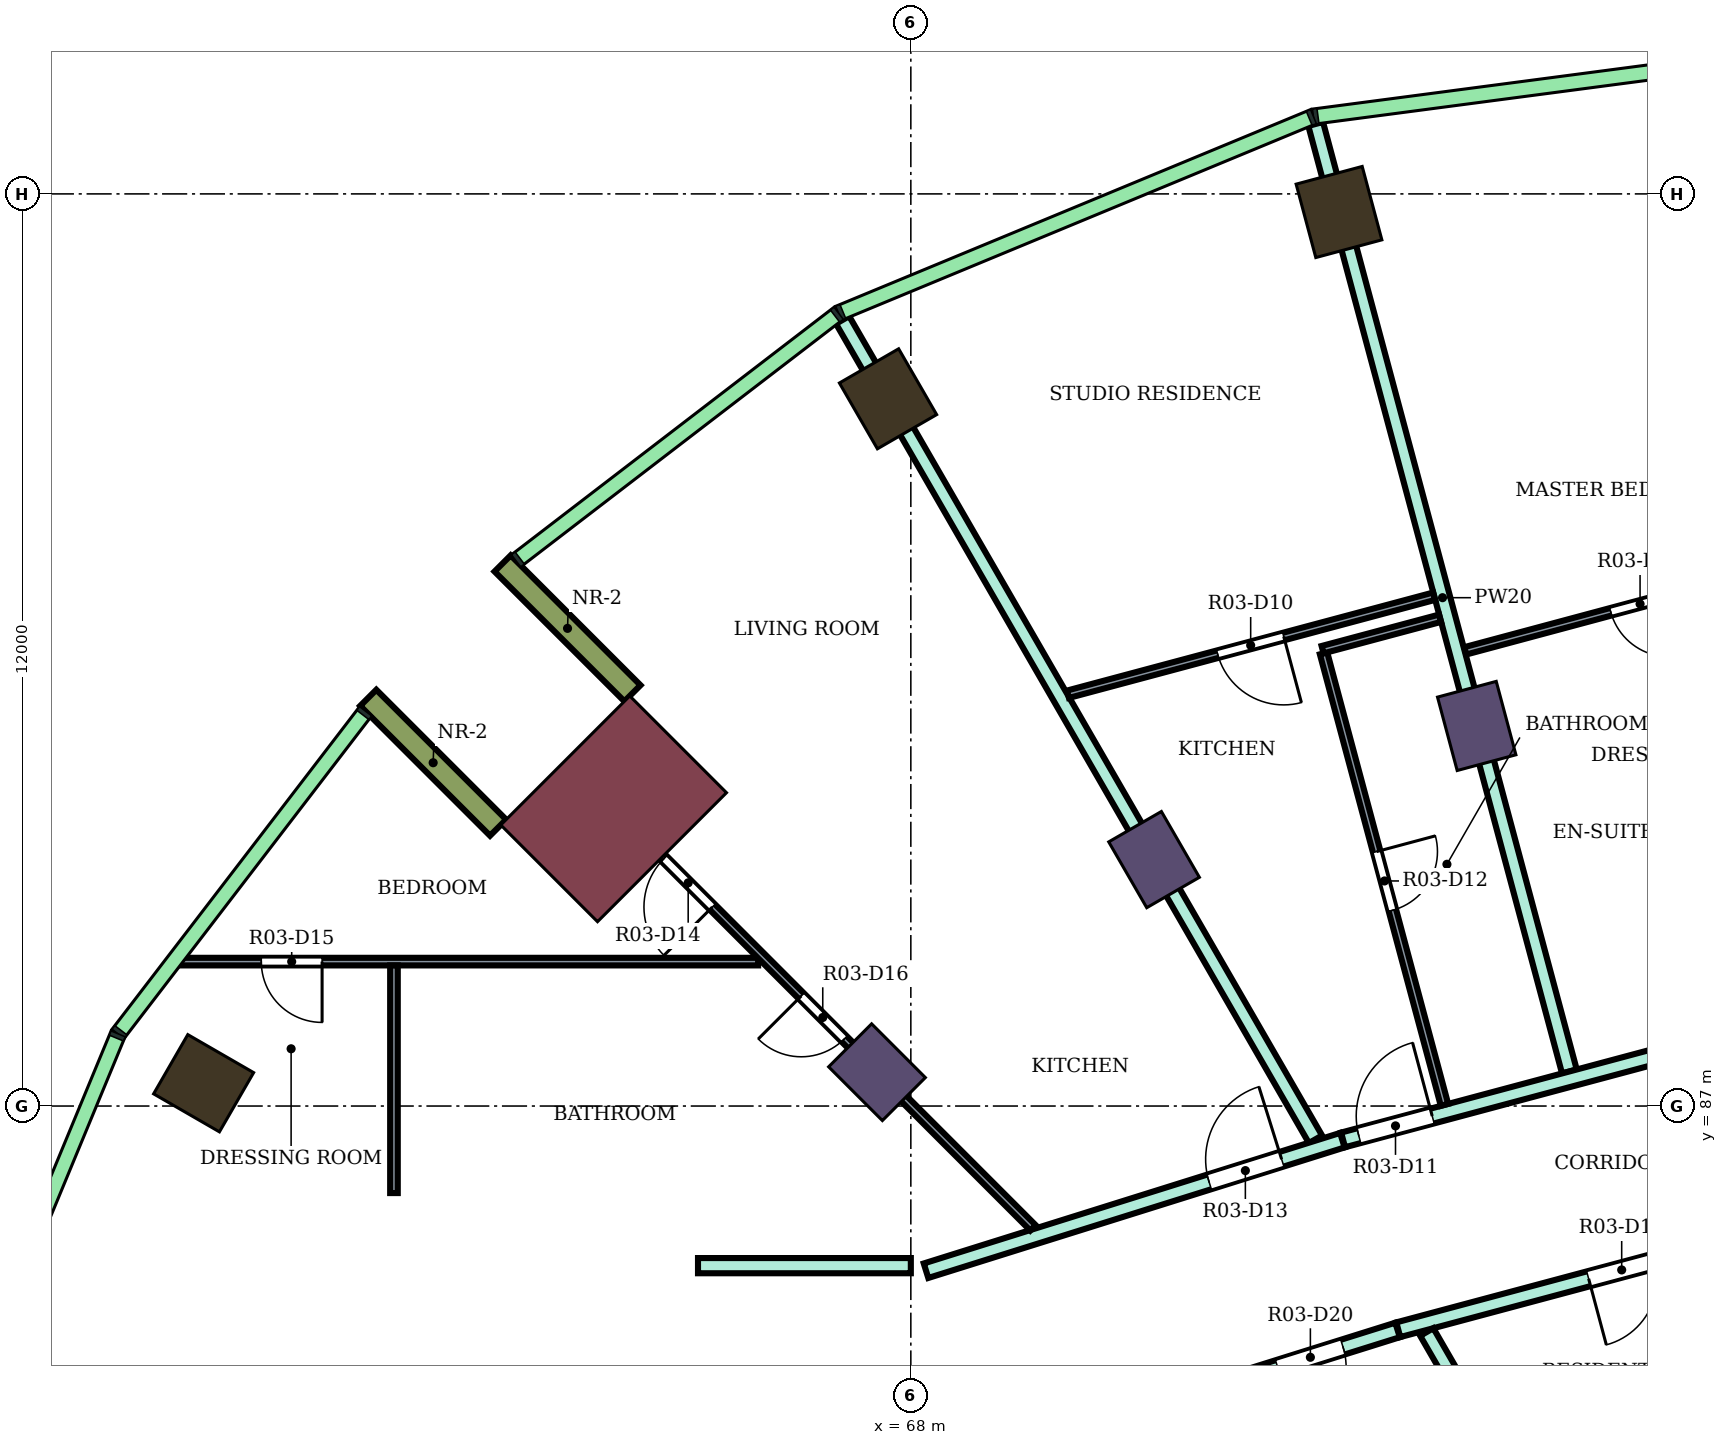
"""IFC4 building model, lengths in metres.
Left out: names, types, materials, properties, quantities, classifications, styles, units other than length and angle.
Written with IfcOpenShell. Run it as: python <this file> out.ifc"""

import sys

from ifc_helpers import new_model, si_unit, direction, frame, frame_2d, origin, origin_2d, place, context, subcontext, project, spatial, rectangle, extrude, element, fill, save


model = new_model("IFC4")
c1 = context("Model", 3, precision=1e-05, world=origin(), true_north=direction((0.0, 1.0)))
c2 = subcontext(c1, "Body", "Model", "MODEL_VIEW")
j1 = project(units=[si_unit("LENGTHUNIT", "METRE"), si_unit("PLANEANGLEUNIT", "RADIAN")], contexts=[c1])
p1 = place(None, origin())
s1 = spatial("IfcSite", under=j1, at=p1, CompositionType="ELEMENT")
p2 = place(p1, origin())
s2 = spatial("IfcBuilding", under=s1, at=p2, CompositionType="ELEMENT")
p3 = place(p2, frame((0.0, 0.0, 186.4)))
s3 = spatial("IfcBuildingStorey", under=s2, at=p3, CompositionType="ELEMENT", Elevation=186.4)
for number, where, z_axis, x_axis in (
    (1, (73.633, 98.762, 0.0), (0.0, 0.0, 1.0), (-0.259, 0.966, 0.0)),
    (2, (67.7, 96.304, 0.0), (0.0, 0.0, 1.0), (-0.5, 0.866, 0.0)),
    (3, (58.696, 87.3, 0.0), (0.0, 0.0, 1.0), (-0.866, 0.5, 0.0)),
):
    element("IfcColumn", number, at=place(p3, frame(where, z_axis=z_axis, x_axis=x_axis)), inside=s3, PredefinedType="COLUMN", context=c2, shape_type="SweptSolid", body=[
        extrude(rectangle(XDim=1.0, YDim=0.9, at=origin_2d()), origin(), (0.0, 0.0, 1.0), 4.1),
    ])
for number, where, z_axis, x_axis in (
    (4, (75.445, 92.0, 0.0), (0.0, 0.0, 1.0), (-0.259, 0.966, 0.0)),
    (5, (71.2, 90.242, 0.0), (0.0, 0.0, 1.0), (-0.5, 0.866, 0.0)),
    (6, (67.555, 87.445, 0.0), (0.0, 0.0, 1.0), (-0.707, 0.707, 0.0)),
):
    element("IfcColumn", number, at=place(p3, frame(where, z_axis=z_axis, x_axis=x_axis)), inside=s3, PredefinedType="COLUMN", context=c2, shape_type="SweptSolid", body=[
        extrude(rectangle(XDim=1.0, YDim=0.8, at=origin_2d()), origin(), (0.0, 0.0, 1.0), 4.1),
    ])
p4 = place(p3, frame((64.09, 90.91, 0.0), z_axis=(0.0, 0.0, 1.0), x_axis=(-0.707106781187, 0.707106781187, 0.0)))
e7 = element("IfcColumn", 7, at=p4, inside=s3, PredefinedType="COLUMN", context=c2, shape_type="SweptSolid", body=[
    extrude(rectangle(XDim=1.8, YDim=2.4, at=origin_2d()), origin(), (0.0, 0.0, 1.0), 4.1),
])
for number, where, z_axis, x_axis in (
    (8, (64.338, 92.43, 0.0), (0.0, 0.0, 1.0), (-0.707, 0.707, 0.0)),
    (9, (62.57, 90.662, 0.0), (0.0, 0.0, 1.0), (-0.707, 0.707, 0.0)),
):
    element("IfcWall", number, at=place(p3, frame(where, z_axis=z_axis, x_axis=x_axis)), inside=s3, PredefinedType="NOTDEFINED", context=c2, shape_type="SweptSolid", body=[
        extrude(rectangle(XDim=2.416, YDim=0.3, at=frame_2d((1.208, 0.0))), origin(), (0.0, 0.0, 1.0), 4.1),
    ])
p5 = place(p3, frame((65.2, 84.9, 0.0), z_axis=(0.0, 0.0, 1.0), x_axis=(1.0, 0.0, 0.0)))
e10 = element("IfcWall", 10, at=p5, inside=s3, PredefinedType="PARTITIONING", context=c2, shape_type="SweptSolid", body=[
    extrude(rectangle(XDim=2.8, YDim=0.2, at=frame_2d((1.4, 0.0))), origin(), (0.0, 0.0, 1.0), 3.65),
])
p6 = place(p3, frame((67.102, 97.342, 0.0), z_axis=(0.0, 0.0, 1.0), x_axis=(0.499940938316, -0.866059500378, 0.0)))
e11 = element("IfcWall", 11, at=p6, inside=s3, PredefinedType="PARTITIONING", context=c2, shape_type="SweptSolid", body=[
    extrude(rectangle(XDim=12.446, YDim=0.2, at=frame_2d((6.223, 0.0))), origin(), (0.0, 0.0, 1.0), 3.65),
])
p7 = place(p3, frame((68.2, 84.833, 0.0), z_axis=(0.0, 0.0, 1.0), x_axis=(0.954204109499, 0.299156342762, 0.0)))
e12 = element("IfcWall", 12, at=p7, inside=s3, PredefinedType="PARTITIONING", context=c2, shape_type="SweptSolid", body=[
    extrude(rectangle(XDim=5.74, YDim=0.2, at=frame_2d((2.87, 0.0))), origin(), (0.0, 0.0, 1.0), 3.65),
])
p8 = place(p7, frame((3.903, 0.0, 0.0)))
e13 = element("IfcOpeningElement", 13, at=p8, cuts=e12, PredefinedType="OPENING", context=c2, shape_type="SweptSolid", body=[
    extrude(rectangle(XDim=1.0, YDim=2.1, at=frame_2d((0.5, 1.05))), frame((0.0, 0.11, 0.0), z_axis=(0.0, -1.0, 0.0), x_axis=(1.0, 0.0, 0.0)), (0.0, 0.0, 1.0), 0.22),
])
p9 = place(p3, frame((72.1, 83.332, 0.0), z_axis=(0.0, 0.0, 1.0), x_axis=(0.954233106619, 0.299063836383, 0.0)))
e14 = element("IfcWall", 14, at=p9, inside=s3, PredefinedType="PARTITIONING", context=c2, shape_type="SweptSolid", body=[
    extrude(rectangle(XDim=2.414, YDim=0.2, at=frame_2d((1.207, 0.0))), origin(), (0.0, 0.0, 1.0), 3.65),
])
p10 = place(p9, frame((0.762, 0.0, 0.0)))
e15 = element("IfcOpeningElement", 15, at=p10, cuts=e14, PredefinedType="OPENING", context=c2, shape_type="SweptSolid", body=[
    extrude(rectangle(XDim=0.9, YDim=2.1, at=frame_2d((0.45, 1.05))), frame((0.0, 0.11, 0.0), z_axis=(0.0, -1.0, 0.0), x_axis=(1.0, 0.0, 0.0)), (0.0, 0.0, 1.0), 0.22),
])
p11 = place(p3, frame((73.326, 99.92, 0.0), z_axis=(0.0, 0.0, 1.0), x_axis=(0.258652861824, -0.965970339643, 0.0)))
e16 = element("IfcWall", 16, at=p11, inside=s3, PredefinedType="PARTITIONING", context=c2, shape_type="SweptSolid", body=[
    extrude(rectangle(XDim=12.904, YDim=0.2, at=frame_2d((6.452, 0.0))), origin(), (0.0, 0.0, 1.0), 3.65),
])
p12 = place(p3, frame((73.687, 86.554, 0.0), z_axis=(0.0, 0.0, 1.0), x_axis=(0.965992724769, 0.258569247387, 0.0)))
e17 = element("IfcWall", 17, at=p12, inside=s3, PredefinedType="PARTITIONING", context=c2, shape_type="SweptSolid", body=[
    extrude(rectangle(XDim=6.486, YDim=0.2, at=frame_2d((3.243, 0.0))), origin(), (0.0, 0.0, 1.0), 3.65),
])
p13 = place(p12, frame((0.214, 0.0, 0.0)))
e18 = element("IfcOpeningElement", 18, at=p13, cuts=e17, PredefinedType="OPENING", context=c2, shape_type="SweptSolid", body=[
    extrude(rectangle(XDim=1.0, YDim=2.1, at=frame_2d((0.5, 1.05))), frame((0.0, 0.11, 0.0), z_axis=(0.0, -1.0, 0.0), x_axis=(1.0, 0.0, 0.0)), (0.0, 0.0, 1.0), 0.22),
])
p14 = place(p3, frame((74.413, 84.057, 0.0), z_axis=(0.0, 0.0, 1.0), x_axis=(0.965972135939, 0.258646153246, 0.0)))
e19 = element("IfcWall", 19, at=p14, inside=s3, PredefinedType="PARTITIONING", context=c2, shape_type="SweptSolid", body=[
    extrude(rectangle(XDim=5.654, YDim=0.2, at=frame_2d((2.827, 0.0))), origin(), (0.0, 0.0, 1.0), 3.65),
])
p15 = place(p14, frame((2.593, 0.0, 0.0)))
e20 = element("IfcOpeningElement", 20, at=p15, cuts=e19, PredefinedType="OPENING", context=c2, shape_type="SweptSolid", body=[
    extrude(rectangle(XDim=0.9, YDim=2.1, at=frame_2d((0.45, 1.05))), frame((0.0, 0.11, 0.0), z_axis=(0.0, -1.0, 0.0), x_axis=(1.0, 0.0, 0.0)), (0.0, 0.0, 1.0), 0.22),
])
p16 = place(p3, frame((74.788, 84.027, 0.0), z_axis=(0.0, 0.0, 1.0), x_axis=(0.499905962189, -0.866079689733, 0.0)))
e21 = element("IfcWall", 21, at=p16, inside=s3, PredefinedType="PARTITIONING", context=c2, shape_type="SweptSolid", body=[
    extrude(rectangle(XDim=2.726, YDim=0.2, at=frame_2d((1.363, 0.0))), origin(), (0.0, 0.0, 1.0), 3.65),
])
p17 = place(p3, frame((58.379, 88.9, 0.0), z_axis=(0.0, 0.0, 1.0), x_axis=(1.0, 0.0, 0.0)))
e22 = element("IfcWall", 22, at=p17, inside=s3, PredefinedType="PARTITIONING", context=c2, shape_type="SweptSolid", body=[
    extrude(rectangle(XDim=7.612, YDim=0.1, at=frame_2d((3.806, 0.0))), origin(), (0.0, 0.0, 1.0), 3.65),
])
p18 = place(p17, frame((1.075, 0.0, 0.0)))
e23 = element("IfcOpeningElement", 23, at=p18, cuts=e22, PredefinedType="OPENING", context=c2, shape_type="SweptSolid", body=[
    extrude(rectangle(XDim=0.8, YDim=2.1, at=frame_2d((0.4, 1.05))), frame((0.0, 0.06, 0.0), z_axis=(0.0, -1.0, 0.0), x_axis=(1.0, 0.0, 0.0)), (0.0, 0.0, 1.0), 0.12),
])
p19 = place(p3, frame((61.2, 85.855, 0.0), z_axis=(0.0, 0.0, 1.0), x_axis=(0.0, 1.0, 0.0)))
e24 = element("IfcWall", 24, at=p19, inside=s3, PredefinedType="PARTITIONING", context=c2, shape_type="SweptSolid", body=[
    extrude(rectangle(XDim=2.995, YDim=0.1, at=frame_2d((1.498, 0.0))), origin(), (0.0, 0.0, 1.0), 3.65),
])
p20 = place(p3, frame((63.599, 91.409, 0.0), z_axis=(0.0, 0.0, 1.0), x_axis=(0.706920044618, -0.707293468453, 0.0)))
e25 = element("IfcWall", 25, at=p20, inside=s3, PredefinedType="PARTITIONING", context=c2, shape_type="SweptSolid", body=[
    extrude(rectangle(XDim=8.499, YDim=0.1, at=frame_2d((4.25, 0.0))), origin(), (0.0, 0.0, 1.0), 3.65),
])
p21 = place(p20, frame((1.632, 0.0, 0.0)))
e26 = element("IfcOpeningElement", 26, at=p21, cuts=e25, PredefinedType="OPENING", context=c2, shape_type="SweptSolid", body=[
    extrude(rectangle(XDim=0.9, YDim=2.1, at=frame_2d((0.45, 1.05))), frame((0.0, 0.06, 0.0), z_axis=(0.0, -1.0, 0.0), x_axis=(1.0, 0.0, 0.0)), (0.0, 0.0, 1.0), 0.12),
])
p22 = place(p20, frame((4.186, 0.0, 0.0)))
e27 = element("IfcOpeningElement", 27, at=p22, cuts=e25, PredefinedType="OPENING", context=c2, shape_type="SweptSolid", body=[
    extrude(rectangle(XDim=0.8, YDim=2.1, at=frame_2d((0.4, 1.05))), frame((0.0, 0.06, 0.0), z_axis=(0.0, -1.0, 0.0), x_axis=(1.0, 0.0, 0.0)), (0.0, 0.0, 1.0), 0.12),
])
p23 = place(p3, frame((70.067, 92.417, 0.0), z_axis=(0.0, 0.0, 1.0), x_axis=(0.965982566978, 0.258607193045, 0.0)))
e28 = element("IfcWall", 28, at=p23, inside=s3, PredefinedType="PARTITIONING", context=c2, shape_type="SweptSolid", body=[
    extrude(rectangle(XDim=4.987, YDim=0.1, at=frame_2d((2.493, 0.0))), origin(), (0.0, 0.0, 1.0), 3.65),
])
p24 = place(p23, frame((2.038, 0.0, 0.0)))
e29 = element("IfcOpeningElement", 29, at=p24, cuts=e28, PredefinedType="OPENING", context=c2, shape_type="SweptSolid", body=[
    extrude(rectangle(XDim=0.9, YDim=2.1, at=frame_2d((0.45, 1.05))), frame((0.0, 0.06, 0.0), z_axis=(0.0, -1.0, 0.0), x_axis=(1.0, 0.0, 0.0)), (0.0, 0.0, 1.0), 0.12),
])
p25 = place(p3, frame((73.43, 92.956, 0.0), z_axis=(0.0, 0.0, 1.0), x_axis=(0.258707643808, -0.965955669291, 0.0)))
e30 = element("IfcWall", 30, at=p25, inside=s3, PredefinedType="PARTITIONING", context=c2, shape_type="SweptSolid", body=[
    extrude(rectangle(XDim=6.15, YDim=0.1, at=frame_2d((3.075, 0.0))), origin(), (0.0, 0.0, 1.0), 3.65),
])
p26 = place(p25, frame((2.7, 0.0, 0.0)))
e31 = element("IfcOpeningElement", 31, at=p26, cuts=e30, PredefinedType="OPENING", context=c2, shape_type="SweptSolid", body=[
    extrude(rectangle(XDim=0.8, YDim=2.1, at=frame_2d((0.4, 1.05))), frame((0.0, 0.06, 0.0), z_axis=(0.0, -1.0, 0.0), x_axis=(1.0, 0.0, 0.0)), (0.0, 0.0, 1.0), 0.12),
])
p27 = place(p3, frame((73.417, 93.004, 0.0), z_axis=(0.0, 0.0, 1.0), x_axis=(0.966062421459, 0.258308725839, 0.0)))
e32 = element("IfcWall", 32, at=p27, inside=s3, PredefinedType="PARTITIONING", context=c2, shape_type="SweptSolid", body=[
    extrude(rectangle(XDim=1.599, YDim=0.1, at=frame_2d((0.8, 0.0))), origin(), (0.0, 0.0, 1.0), 3.65),
])
p28 = place(p3, frame((75.295, 92.989, 0.0), z_axis=(0.0, 0.0, 1.0), x_axis=(0.965829517501, 0.259178207271, 0.0)))
e33 = element("IfcWall", 33, at=p28, inside=s3, PredefinedType="PARTITIONING", context=c2, shape_type="SweptSolid", body=[
    extrude(rectangle(XDim=4.812, YDim=0.1, at=frame_2d((2.406, 0.0))), origin(), (0.0, 0.0, 1.0), 3.65),
])
p29 = place(p28, frame((1.981, 0.0, 0.0)))
e34 = element("IfcOpeningElement", 34, at=p29, cuts=e33, PredefinedType="OPENING", context=c2, shape_type="SweptSolid", body=[
    extrude(rectangle(XDim=0.8, YDim=2.1, at=frame_2d((0.4, 1.05))), frame((0.0, 0.06, 0.0), z_axis=(0.0, -1.0, 0.0), x_axis=(1.0, 0.0, 0.0)), (0.0, 0.0, 1.0), 0.12),
])
p30 = place(p29, frame((0.8, 0.0, 0.0), z_axis=(0.0, 0.0, 1.0), x_axis=(-1.0, 0.0, 0.0)))
e35 = element("IfcDoor", 35, at=p30, inside=s3, OperationType="SINGLE_SWING_LEFT", PredefinedType="DOOR", context=c2, shape_type="SweptSolid", body=[
    extrude(rectangle(XDim=0.8, YDim=2.1, at=frame_2d((0.4, 1.05))), frame((0.0, 0.025, 0.0), z_axis=(0.0, -1.0, 0.0), x_axis=(1.0, 0.0, 0.0)), (0.0, 0.0, 1.0), 0.05),
])
fill(e34, e35)
p31 = place(p24, frame((0.9, 0.0, 0.0), z_axis=(0.0, 0.0, 1.0), x_axis=(-1.0, 0.0, 0.0)))
e36 = element("IfcDoor", 36, at=p31, inside=s3, OperationType="SINGLE_SWING_LEFT", PredefinedType="DOOR", context=c2, shape_type="SweptSolid", body=[
    extrude(rectangle(XDim=0.9, YDim=2.1, at=frame_2d((0.45, 1.05))), frame((0.0, 0.025, 0.0), z_axis=(0.0, -1.0, 0.0), x_axis=(1.0, 0.0, 0.0)), (0.0, 0.0, 1.0), 0.05),
])
fill(e29, e36)
p32 = place(p13, origin())
e37 = element("IfcDoor", 37, at=p32, inside=s3, OperationType="SINGLE_SWING_RIGHT", PredefinedType="DOOR", context=c2, shape_type="SweptSolid", body=[
    extrude(rectangle(XDim=1.0, YDim=2.1, at=frame_2d((0.5, 1.05))), frame((0.0, 0.025, 0.0), z_axis=(0.0, -1.0, 0.0), x_axis=(1.0, 0.0, 0.0)), (0.0, 0.0, 1.0), 0.05),
])
fill(e18, e37)
p33 = place(p26, origin())
e38 = element("IfcDoor", 38, at=p33, inside=s3, OperationType="SINGLE_SWING_LEFT", PredefinedType="DOOR", context=c2, shape_type="SweptSolid", body=[
    extrude(rectangle(XDim=0.8, YDim=2.1, at=frame_2d((0.4, 1.05))), frame((0.0, 0.025, 0.0), z_axis=(0.0, -1.0, 0.0), x_axis=(1.0, 0.0, 0.0)), (0.0, 0.0, 1.0), 0.05),
])
fill(e31, e38)
p34 = place(p8, origin())
e39 = element("IfcDoor", 39, at=p34, inside=s3, OperationType="SINGLE_SWING_RIGHT", PredefinedType="DOOR", context=c2, shape_type="SweptSolid", body=[
    extrude(rectangle(XDim=1.0, YDim=2.1, at=frame_2d((0.5, 1.05))), frame((0.0, 0.025, 0.0), z_axis=(0.0, -1.0, 0.0), x_axis=(1.0, 0.0, 0.0)), (0.0, 0.0, 1.0), 0.05),
])
fill(e13, e39)
p35 = place(p21, frame((0.9, 0.0, 0.0), z_axis=(0.0, 0.0, 1.0), x_axis=(-1.0, 0.0, 0.0)))
e40 = element("IfcDoor", 40, at=p35, inside=s3, OperationType="SINGLE_SWING_LEFT", PredefinedType="DOOR", context=c2, shape_type="SweptSolid", body=[
    extrude(rectangle(XDim=0.9, YDim=2.1, at=frame_2d((0.45, 1.05))), frame((0.0, 0.025, 0.0), z_axis=(0.0, -1.0, 0.0), x_axis=(1.0, 0.0, 0.0)), (0.0, 0.0, 1.0), 0.05),
])
fill(e26, e40)
p36 = place(p18, frame((0.8, 0.0, 0.0), z_axis=(0.0, 0.0, 1.0), x_axis=(-1.0, 0.0, 0.0)))
e41 = element("IfcDoor", 41, at=p36, inside=s3, OperationType="SINGLE_SWING_LEFT", PredefinedType="DOOR", context=c2, shape_type="SweptSolid", body=[
    extrude(rectangle(XDim=0.8, YDim=2.1, at=frame_2d((0.4, 1.05))), frame((0.0, 0.025, 0.0), z_axis=(0.0, -1.0, 0.0), x_axis=(1.0, 0.0, 0.0)), (0.0, 0.0, 1.0), 0.05),
])
fill(e23, e41)
p37 = place(p22, frame((0.8, 0.0, 0.0), z_axis=(0.0, 0.0, 1.0), x_axis=(-1.0, 0.0, 0.0)))
e42 = element("IfcDoor", 42, at=p37, inside=s3, OperationType="SINGLE_SWING_RIGHT", PredefinedType="DOOR", context=c2, shape_type="SweptSolid", body=[
    extrude(rectangle(XDim=0.8, YDim=2.1, at=frame_2d((0.4, 1.05))), frame((0.0, 0.025, 0.0), z_axis=(0.0, -1.0, 0.0), x_axis=(1.0, 0.0, 0.0)), (0.0, 0.0, 1.0), 0.05),
])
fill(e27, e42)
p38 = place(p15, frame((0.9, 0.0, 0.0), z_axis=(0.0, 0.0, 1.0), x_axis=(-1.0, 0.0, 0.0)))
e43 = element("IfcDoor", 43, at=p38, inside=s3, OperationType="SINGLE_SWING_RIGHT", PredefinedType="DOOR", context=c2, shape_type="SweptSolid", body=[
    extrude(rectangle(XDim=0.9, YDim=2.1, at=frame_2d((0.45, 1.05))), frame((0.0, 0.025, 0.0), z_axis=(0.0, -1.0, 0.0), x_axis=(1.0, 0.0, 0.0)), (0.0, 0.0, 1.0), 0.05),
])
fill(e20, e43)
p39 = place(p10, frame((0.9, 0.0, 0.0), z_axis=(0.0, 0.0, 1.0), x_axis=(-1.0, 0.0, 0.0)))
e44 = element("IfcDoor", 44, at=p39, inside=s3, OperationType="SINGLE_SWING_RIGHT", PredefinedType="DOOR", context=c2, shape_type="SweptSolid", body=[
    extrude(rectangle(XDim=0.9, YDim=2.1, at=frame_2d((0.45, 1.05))), frame((0.0, 0.025, 0.0), z_axis=(0.0, -1.0, 0.0), x_axis=(1.0, 0.0, 0.0)), (0.0, 0.0, 1.0), 0.05),
])
fill(e15, e44)
save(model, sys.argv[1])
